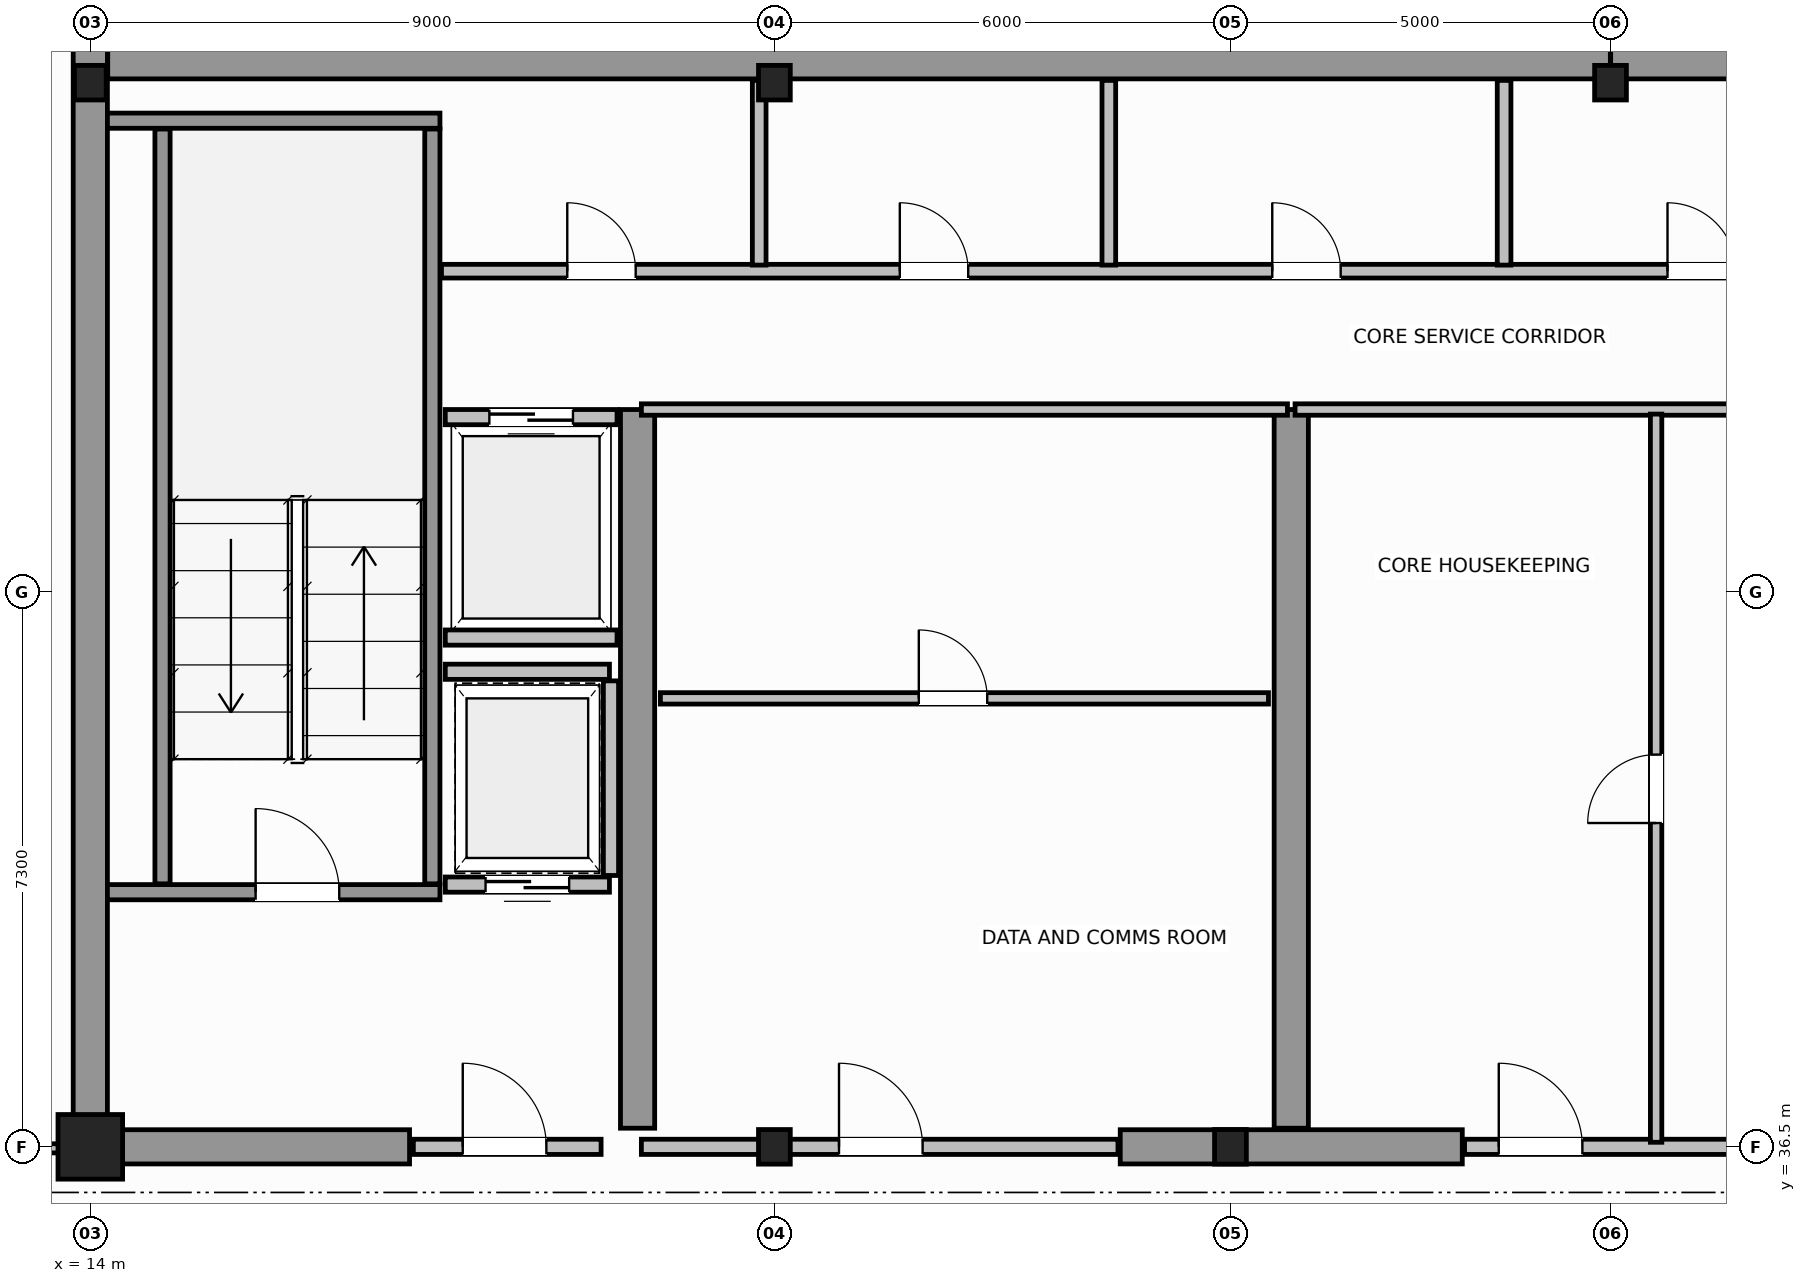
"""IFC4 building model, lengths in metres.
Left out: names, types, materials, properties, quantities, classifications, styles, units other than length and angle.
Written with IfcOpenShell. Run it as: python <this file> out.ifc"""

import sys

from ifc_helpers import new_model, si_unit, direction, frame, frame_2d, origin, origin_2d, place, context, subcontext, project, spatial, rectangle, i_section, extrude, source, transform, mapped, element, fill, save


model = new_model("IFC4")
c1 = context("Model", 3, precision=1e-05, world=origin(), true_north=direction((0.0, 1.0)))
c2 = subcontext(c1, "Body", "Model", "MODEL_VIEW")
j1 = project(units=[si_unit("LENGTHUNIT", "METRE"), si_unit("PLANEANGLEUNIT", "RADIAN")], contexts=[c1])
p1 = place(None, origin())
s1 = spatial("IfcSite", under=j1, at=p1, CompositionType="ELEMENT")
p2 = place(p1, origin())
s2 = spatial("IfcBuilding", under=s1, at=p2, CompositionType="ELEMENT")
p3 = place(p2, frame((0.0, 0.0, 265.0)))
s3 = spatial("IfcBuildingStorey", under=s2, at=p3, CompositionType="ELEMENT", Elevation=265.0)
m1 = source(origin(), c2, "Body", "SweptSolid", [
    extrude(rectangle(XDim=0.85, YDim=0.85, at=origin_2d()), origin(), (0.0, 0.0, 1.0), 3.8),
])
p4 = place(p3, frame((14.0, 36.5, 0.0), z_axis=(0.0, 0.0, 1.0), x_axis=(1.0, 0.0, 0.0)))
e1 = element("IfcColumn", 1, at=p4, inside=s3, PredefinedType="COLUMN", context=c2, shape_type="MappedRepresentation", body=[
    mapped(m1, transform((0.0, 0.0, 0.0), scale=1.0)),
])
m2 = source(origin(), c2, "Body", "SweptSolid", [
    extrude(i_section(OverallWidth=0.418, OverallDepth=0.455, WebThickness=0.042, FlangeThickness=0.058, FilletRadius=0.015, at=origin_2d()), origin(), (0.0, 0.0, 1.0), 3.8),
])
for number, where, z_axis, x_axis in (
    (2, (23.0, 36.5, 0.0), (0.0, 0.0, 1.0), (1.0, 0.0, 0.0)),
    (3, (29.0, 36.5, 0.0), (0.0, 0.0, 1.0), (1.0, 0.0, 0.0)),
    (4, (14.0, 50.5, 0.0), (0.0, 0.0, 1.0), (1.0, 0.0, 0.0)),
    (5, (23.0, 50.5, 0.0), (0.0, 0.0, 1.0), (1.0, 0.0, 0.0)),
    (6, (34.0, 50.5, 0.0), (0.0, 0.0, 1.0), (1.0, 0.0, 0.0)),
):
    element("IfcColumn", number, at=place(p3, frame(where, z_axis=z_axis, x_axis=x_axis)), inside=s3, PredefinedType="COLUMN", context=c2, shape_type="MappedRepresentation", body=[
        mapped(m2, transform((0.0, 0.0, 0.0), scale=1.0)),
    ])
for number, where, z_axis, x_axis in (
    (7, (14.229, 50.775, 0.0), (0.0, 0.0, 1.0), (1.0, 0.0, 0.0)),
    (8, (34.002, 50.775, 0.0), (0.0, 0.0, 1.0), (1.0, 0.0, 0.0)),
):
    element("IfcWall", number, at=place(p3, frame(where, z_axis=z_axis, x_axis=x_axis)), inside=s3, PredefinedType="SHEAR", context=c2, shape_type="SweptSolid", body=[
        extrude(rectangle(XDim=19.769, YDim=0.45, at=frame_2d((9.885, 0.0))), origin(), (0.0, 0.0, 1.0), 3.8),
    ])
p5 = place(p3, frame((14.0, 36.5, 0.0), z_axis=(0.0, 0.0, 1.0), x_axis=(0.0, 1.0, 0.0)))
e9 = element("IfcWall", 9, at=p5, inside=s3, PredefinedType="SHEAR", context=c2, shape_type="SweptSolid", body=[
    extrude(rectangle(XDim=14.5, YDim=0.45, at=frame_2d((7.25, 0.0))), origin(), (0.0, 0.0, 1.0), 3.8),
])
p6 = place(p3, frame((14.245, 36.5, 0.0), z_axis=(0.0, 0.0, 1.0), x_axis=(1.0, 0.0, 0.0)))
e10 = element("IfcWall", 10, at=p6, inside=s3, PredefinedType="SHEAR", context=c2, shape_type="SweptSolid", body=[
    extrude(rectangle(XDim=3.955, YDim=0.45, at=frame_2d((1.978, 0.0))), origin(), (0.0, 0.0, 1.0), 2.58),
])
p7 = place(p3, frame((27.55, 36.5, 0.0), z_axis=(0.0, 0.0, 1.0), x_axis=(1.0, 0.0, 0.0)))
e11 = element("IfcWall", 11, at=p7, inside=s3, PredefinedType="SHEAR", context=c2, shape_type="SweptSolid", body=[
    extrude(rectangle(XDim=4.5, YDim=0.45, at=frame_2d((2.25, 0.0))), origin(), (0.0, 0.0, 1.0), 3.8),
])
for number, where, z_axis, x_axis in (
    (12, (21.2, 36.745, 0.0), (0.0, 0.0, 1.0), (0.0, 1.0, 0.0)),
    (13, (29.8, 36.745, 0.0), (0.0, 0.0, 1.0), (0.0, 1.0, 0.0)),
):
    element("IfcWall", number, at=place(p3, frame(where, z_axis=z_axis, x_axis=x_axis)), inside=s3, PredefinedType="SHEAR", context=c2, shape_type="SweptSolid", body=[
        extrude(rectangle(XDim=9.455, YDim=0.45, at=frame_2d((4.728, 0.0))), origin(), (0.0, 0.0, 1.0), 3.8),
    ])
p8 = place(p3, frame((14.225, 39.85, 0.0), z_axis=(0.0, 0.0, 1.0), x_axis=(1.0, 0.0, 0.0)))
e14 = element("IfcWall", 14, at=p8, inside=s3, PredefinedType="SOLIDWALL", context=c2, shape_type="SweptSolid", body=[
    extrude(rectangle(XDim=4.375, YDim=0.2, at=frame_2d((2.188, 0.0))), origin(), (0.0, 0.0, 1.0), 3.8),
])
p9 = place(p8, frame((1.95, 0.0, 0.0)))
e15 = element("IfcOpeningElement", 15, at=p9, cuts=e14, PredefinedType="OPENING", context=c2, shape_type="SweptSolid", body=[
    extrude(rectangle(XDim=1.1, YDim=2.15, at=frame_2d((0.55, 1.075))), frame((0.0, 0.11, 0.0), z_axis=(0.0, -1.0, 0.0), x_axis=(1.0, 0.0, 0.0)), (0.0, 0.0, 1.0), 0.22),
])
p10 = place(p3, frame((14.225, 50.0, 0.0), z_axis=(0.0, 0.0, 1.0), x_axis=(1.0, 0.0, 0.0)))
e16 = element("IfcWall", 16, at=p10, inside=s3, PredefinedType="SOLIDWALL", context=c2, shape_type="SweptSolid", body=[
    extrude(rectangle(XDim=4.375, YDim=0.2, at=frame_2d((2.188, 0.0))), origin(), (0.0, 0.0, 1.0), 3.8),
])
for number, where, z_axis, x_axis in (
    (17, (14.95, 39.96, 0.0), (0.0, 0.0, 1.0), (0.0, 1.0, 0.0)),
    (18, (18.5, 39.96, 0.0), (0.0, 0.0, 1.0), (0.0, 1.0, 0.0)),
):
    element("IfcWall", number, at=place(p3, frame(where, z_axis=z_axis, x_axis=x_axis)), inside=s3, PredefinedType="SOLIDWALL", context=c2, shape_type="SweptSolid", body=[
        extrude(rectangle(XDim=9.93, YDim=0.2, at=frame_2d((4.965, 0.0))), origin(), (0.0, 0.0, 1.0), 3.8),
    ])
p11 = place(p3, frame((18.25, 36.5, 0.0), z_axis=(0.0, 0.0, 1.0), x_axis=(1.0, 0.0, 0.0)))
e19 = element("IfcWall", 19, at=p11, inside=s3, PredefinedType="SOLIDWALL", context=c2, shape_type="SweptSolid", body=[
    extrude(rectangle(XDim=2.47, YDim=0.2, at=frame_2d((1.235, 0.0))), origin(), (0.0, 0.0, 1.0), 2.57),
])
p12 = place(p11, frame((0.65, 0.0, 0.0)))
e20 = element("IfcOpeningElement", 20, at=p12, cuts=e19, PredefinedType="OPENING", context=c2, shape_type="SweptSolid", body=[
    extrude(rectangle(XDim=1.1, YDim=2.15, at=frame_2d((0.55, 1.075))), frame((0.0, 0.11, 0.0), z_axis=(0.0, -1.0, 0.0), x_axis=(1.0, 0.0, 0.0)), (0.0, 0.0, 1.0), 0.22),
])
p13 = place(p3, frame((18.67, 46.1, 0.0), z_axis=(0.0, 0.0, 1.0), x_axis=(1.0, 0.0, 0.0)))
e21 = element("IfcWall", 21, at=p13, inside=s3, PredefinedType="SOLIDWALL", context=c2, shape_type="SweptSolid", body=[
    extrude(rectangle(XDim=2.26, YDim=0.2, at=frame_2d((1.13, 0.0))), origin(), (0.0, 0.0, 1.0), 3.58),
])
p14 = place(p13, frame((0.58, 0.0, 0.0)))
e22 = element("IfcOpeningElement", 22, at=p14, cuts=e21, PredefinedType="OPENING", context=c2, shape_type="SweptSolid", body=[
    extrude(rectangle(XDim=1.1, YDim=2.15, at=frame_2d((0.55, 1.075))), frame((0.0, 0.11, 0.0), z_axis=(0.0, -1.0, 0.0), x_axis=(1.0, 0.0, 0.0)), (0.0, 0.0, 1.0), 0.22),
])
p15 = place(p3, frame((18.67, 43.2, 0.0), z_axis=(0.0, 0.0, 1.0), x_axis=(1.0, 0.0, 0.0)))
e23 = element("IfcWall", 23, at=p15, inside=s3, PredefinedType="SOLIDWALL", context=c2, shape_type="SweptSolid", body=[
    extrude(rectangle(XDim=2.26, YDim=0.2, at=frame_2d((1.13, 0.0))), origin(), (0.0, 0.0, 1.0), 3.58),
])
p16 = place(p3, frame((18.67, 39.95, 0.0), z_axis=(0.0, 0.0, 1.0), x_axis=(1.0, 0.0, 0.0)))
e24 = element("IfcWall", 24, at=p16, inside=s3, PredefinedType="SOLIDWALL", context=c2, shape_type="SweptSolid", body=[
    extrude(rectangle(XDim=2.16, YDim=0.2, at=frame_2d((1.08, 0.0))), origin(), (0.0, 0.0, 1.0), 3.58),
])
p17 = place(p16, frame((0.53, 0.0, 0.0)))
e25 = element("IfcOpeningElement", 25, at=p17, cuts=e24, PredefinedType="OPENING", context=c2, shape_type="SweptSolid", body=[
    extrude(rectangle(XDim=1.1, YDim=2.15, at=frame_2d((0.55, 1.075))), frame((0.0, 0.11, 0.0), z_axis=(0.0, -1.0, 0.0), x_axis=(1.0, 0.0, 0.0)), (0.0, 0.0, 1.0), 0.22),
])
p18 = place(p3, frame((18.67, 42.75, 0.0), z_axis=(0.0, 0.0, 1.0), x_axis=(1.0, 0.0, 0.0)))
e26 = element("IfcWall", 26, at=p18, inside=s3, PredefinedType="SOLIDWALL", context=c2, shape_type="SweptSolid", body=[
    extrude(rectangle(XDim=2.16, YDim=0.2, at=frame_2d((1.08, 0.0))), origin(), (0.0, 0.0, 1.0), 3.58),
])
p19 = place(p3, frame((20.85, 40.07, 0.0), z_axis=(0.0, 0.0, 1.0), x_axis=(0.0, 1.0, 0.0)))
e27 = element("IfcWall", 27, at=p19, inside=s3, PredefinedType="SOLIDWALL", context=c2, shape_type="SweptSolid", body=[
    extrude(rectangle(XDim=2.56, YDim=0.2, at=frame_2d((1.28, 0.0))), origin(), (0.0, 0.0, 1.0), 3.58),
])
p20 = place(p3, frame((21.25, 36.5, 0.0), z_axis=(0.0, 0.0, 1.0), x_axis=(1.0, 0.0, 0.0)))
e28 = element("IfcWall", 28, at=p20, inside=s3, PredefinedType="SOLIDWALL", context=c2, shape_type="SweptSolid", body=[
    extrude(rectangle(XDim=6.27, YDim=0.2, at=frame_2d((3.135, 0.0))), origin(), (0.0, 0.0, 1.0), 2.37),
])
p21 = place(p20, frame((2.6, 0.0, 0.0)))
e29 = element("IfcOpeningElement", 29, at=p21, cuts=e28, PredefinedType="OPENING", context=c2, shape_type="SweptSolid", body=[
    extrude(rectangle(XDim=1.1, YDim=2.15, at=frame_2d((0.55, 1.075))), frame((0.0, 0.11, 0.0), z_axis=(0.0, -1.0, 0.0), x_axis=(1.0, 0.0, 0.0)), (0.0, 0.0, 1.0), 0.22),
])
p22 = place(p3, frame((21.25, 46.2, 0.0), z_axis=(0.0, 0.0, 1.0), x_axis=(1.0, 0.0, 0.0)))
e30 = element("IfcWall", 30, at=p22, inside=s3, PredefinedType="PARTITIONING", context=c2, shape_type="SweptSolid", body=[
    extrude(rectangle(XDim=8.5, YDim=0.15, at=frame_2d((4.25, 0.0))), origin(), (0.0, 0.0, 1.0), 3.58),
])
p23 = place(p3, frame((21.5, 42.4, 0.0), z_axis=(0.0, 0.0, 1.0), x_axis=(1.0, 0.0, 0.0)))
e31 = element("IfcWall", 31, at=p23, inside=s3, PredefinedType="PARTITIONING", context=c2, shape_type="SweptSolid", body=[
    extrude(rectangle(XDim=8.0, YDim=0.15, at=frame_2d((4.0, 0.0))), origin(), (0.0, 0.0, 1.0), 3.58),
])
p24 = place(p23, frame((3.4, 0.0, 0.0)))
e32 = element("IfcOpeningElement", 32, at=p24, cuts=e31, PredefinedType="OPENING", context=c2, shape_type="SweptSolid", body=[
    extrude(rectangle(XDim=0.9, YDim=2.1, at=frame_2d((0.45, 1.05))), frame((0.0, 0.085, 0.0), z_axis=(0.0, -1.0, 0.0), x_axis=(1.0, 0.0, 0.0)), (0.0, 0.0, 1.0), 0.17),
])
p25 = place(p3, frame((32.08, 36.5, 0.0), z_axis=(0.0, 0.0, 1.0), x_axis=(1.0, 0.0, 0.0)))
e33 = element("IfcWall", 33, at=p25, inside=s3, PredefinedType="SOLIDWALL", context=c2, shape_type="SweptSolid", body=[
    extrude(rectangle(XDim=4.04, YDim=0.2, at=frame_2d((2.02, 0.0))), origin(), (0.0, 0.0, 1.0), 2.37),
])
p26 = place(p25, frame((0.45, 0.0, 0.0)))
e34 = element("IfcOpeningElement", 34, at=p26, cuts=e33, PredefinedType="OPENING", context=c2, shape_type="SweptSolid", body=[
    extrude(rectangle(XDim=1.1, YDim=2.15, at=frame_2d((0.55, 1.075))), frame((0.0, 0.11, 0.0), z_axis=(0.0, -1.0, 0.0), x_axis=(1.0, 0.0, 0.0)), (0.0, 0.0, 1.0), 0.22),
])
p27 = place(p3, frame((29.85, 46.2, 0.0), z_axis=(0.0, 0.0, 1.0), x_axis=(1.0, 0.0, 0.0)))
e35 = element("IfcWall", 35, at=p27, inside=s3, PredefinedType="PARTITIONING", context=c2, shape_type="SweptSolid", body=[
    extrude(rectangle(XDim=8.5, YDim=0.15, at=frame_2d((4.25, 0.0))), origin(), (0.0, 0.0, 1.0), 3.58),
])
p28 = place(p3, frame((34.6, 36.56, 0.0), z_axis=(0.0, 0.0, 1.0), x_axis=(0.0, 1.0, 0.0)))
e36 = element("IfcWall", 36, at=p28, inside=s3, PredefinedType="PARTITIONING", context=c2, shape_type="SweptSolid", body=[
    extrude(rectangle(XDim=9.58, YDim=0.15, at=frame_2d((4.79, 0.0))), origin(), (0.0, 0.0, 1.0), 3.58),
])
p29 = place(p28, frame((4.2, 0.0, 0.0)))
e37 = element("IfcOpeningElement", 37, at=p29, cuts=e36, PredefinedType="OPENING", context=c2, shape_type="SweptSolid", body=[
    extrude(rectangle(XDim=0.9, YDim=2.1, at=frame_2d((0.45, 1.05))), frame((0.0, 0.085, 0.0), z_axis=(0.0, -1.0, 0.0), x_axis=(1.0, 0.0, 0.0)), (0.0, 0.0, 1.0), 0.17),
])
p30 = place(p3, frame((18.62, 48.02, 0.0), z_axis=(0.0, 0.0, 1.0), x_axis=(1.0, 0.0, 0.0)))
e38 = element("IfcWall", 38, at=p30, inside=s3, PredefinedType="PLUMBINGWALL", context=c2, shape_type="SweptSolid", body=[
    extrude(rectangle(XDim=30.76, YDim=0.18, at=frame_2d((15.38, 0.0))), origin(), (0.0, 0.0, 1.0), 3.58),
])
p31 = place(p30, frame((1.655, 0.0, 0.0)))
e39 = element("IfcOpeningElement", 39, at=p31, cuts=e38, PredefinedType="OPENING", context=c2, shape_type="SweptSolid", body=[
    extrude(rectangle(XDim=0.9, YDim=2.15, at=frame_2d((0.45, 1.075))), frame((0.0, 0.1, 0.0), z_axis=(0.0, -1.0, 0.0), x_axis=(1.0, 0.0, 0.0)), (0.0, 0.0, 1.0), 0.2),
])
p32 = place(p30, frame((6.03, 0.0, 0.0)))
e40 = element("IfcOpeningElement", 40, at=p32, cuts=e38, PredefinedType="OPENING", context=c2, shape_type="SweptSolid", body=[
    extrude(rectangle(XDim=0.9, YDim=2.15, at=frame_2d((0.45, 1.075))), frame((0.0, 0.1, 0.0), z_axis=(0.0, -1.0, 0.0), x_axis=(1.0, 0.0, 0.0)), (0.0, 0.0, 1.0), 0.2),
])
p33 = place(p30, frame((10.93, 0.0, 0.0)))
e41 = element("IfcOpeningElement", 41, at=p33, cuts=e38, PredefinedType="OPENING", context=c2, shape_type="SweptSolid", body=[
    extrude(rectangle(XDim=0.9, YDim=2.15, at=frame_2d((0.45, 1.075))), frame((0.0, 0.1, 0.0), z_axis=(0.0, -1.0, 0.0), x_axis=(1.0, 0.0, 0.0)), (0.0, 0.0, 1.0), 0.2),
])
p34 = place(p30, frame((16.13, 0.0, 0.0)))
e42 = element("IfcOpeningElement", 42, at=p34, cuts=e38, PredefinedType="OPENING", context=c2, shape_type="SweptSolid", body=[
    extrude(rectangle(XDim=0.9, YDim=2.15, at=frame_2d((0.45, 1.075))), frame((0.0, 0.1, 0.0), z_axis=(0.0, -1.0, 0.0), x_axis=(1.0, 0.0, 0.0)), (0.0, 0.0, 1.0), 0.2),
])
p35 = place(p30, frame((21.73, 0.0, 0.0)))
e43 = element("IfcOpeningElement", 43, at=p35, cuts=e38, PredefinedType="OPENING", context=c2, shape_type="SweptSolid", body=[
    extrude(rectangle(XDim=0.9, YDim=2.15, at=frame_2d((0.45, 1.075))), frame((0.0, 0.1, 0.0), z_axis=(0.0, -1.0, 0.0), x_axis=(1.0, 0.0, 0.0)), (0.0, 0.0, 1.0), 0.2),
])
p36 = place(p30, frame((27.505, 0.0, 0.0)))
e44 = element("IfcOpeningElement", 44, at=p36, cuts=e38, PredefinedType="OPENING", context=c2, shape_type="SweptSolid", body=[
    extrude(rectangle(XDim=0.9, YDim=2.15, at=frame_2d((0.45, 1.075))), frame((0.0, 0.1, 0.0), z_axis=(0.0, -1.0, 0.0), x_axis=(1.0, 0.0, 0.0)), (0.0, 0.0, 1.0), 0.2),
])
p37 = place(p3, frame((22.8, 48.1, 0.0), z_axis=(0.0, 0.0, 1.0), x_axis=(0.0, 1.0, 0.0)))
e45 = element("IfcWall", 45, at=p37, inside=s3, PredefinedType="PLUMBINGWALL", context=c2, shape_type="SweptSolid", body=[
    extrude(rectangle(XDim=2.43, YDim=0.18, at=frame_2d((1.215, 0.0))), origin(), (0.0, 0.0, 1.0), 2.37),
])
for number, where, z_axis, x_axis in (
    (46, (27.4, 48.1, 0.0), (0.0, 0.0, 1.0), (0.0, 1.0, 0.0)),
    (47, (32.6, 48.1, 0.0), (0.0, 0.0, 1.0), (0.0, 1.0, 0.0)),
):
    element("IfcWall", number, at=place(p3, frame(where, z_axis=z_axis, x_axis=x_axis)), inside=s3, PredefinedType="PLUMBINGWALL", context=c2, shape_type="SweptSolid", body=[
        extrude(rectangle(XDim=2.43, YDim=0.18, at=frame_2d((1.215, 0.0))), origin(), (0.0, 0.0, 1.0), 3.58),
    ])
p38 = place(p3, frame((7.321, 36.48, 0.0), z_axis=(0.0, 0.0, 1.0), x_axis=(1.0, 0.0, 0.0)))
e48 = element("IfcWall", 48, at=p38, inside=s3, PredefinedType="PARTITIONING", context=c2, shape_type="SweptSolid", body=[
    extrude(rectangle(XDim=6.619, YDim=0.12, at=frame_2d((3.31, 0.0))), origin(), (0.0, 0.0, 1.0), 2.37),
])
p39 = place(p38, frame((2.859, 0.0, 0.0)))
e49 = element("IfcOpeningElement", 49, at=p39, cuts=e48, PredefinedType="OPENING", context=c2, shape_type="SweptSolid", body=[
    extrude(rectangle(XDim=0.9, YDim=2.15, at=frame_2d((0.45, 1.075))), frame((0.0, 0.07, 0.0), z_axis=(0.0, -1.0, 0.0), x_axis=(1.0, 0.0, 0.0)), (0.0, 0.0, 1.0), 0.14),
])
m3 = source(origin(), c2, "Body", "SweptSolid", [
    extrude(rectangle(XDim=1.1, YDim=2.15, at=frame_2d((0.55, 1.075))), frame((0.0, 0.025, 0.0), z_axis=(0.0, -1.0, 0.0), x_axis=(1.0, 0.0, 0.0)), (0.0, 0.0, 1.0), 0.05),
])
p40 = place(p9, origin())
e50 = element("IfcDoor", 50, at=p40, inside=s3, OperationType="SINGLE_SWING_LEFT", PredefinedType="DOOR", context=c2, shape_type="MappedRepresentation", body=[
    mapped(m3, transform((0.0, 0.0, 0.0), scale=1.0)),
])
fill(e15, e50)
p41 = place(p12, origin())
e51 = element("IfcDoor", 51, at=p41, inside=s3, OperationType="SINGLE_SWING_RIGHT", PredefinedType="DOOR", context=c2, shape_type="MappedRepresentation", body=[
    mapped(m3, transform((0.0, 0.0, 0.0), scale=1.0)),
])
fill(e20, e51)
p42 = place(p14, origin())
e52 = element("IfcDoor", 52, at=p42, inside=s3, OperationType="DOUBLE_DOOR_SLIDING", PredefinedType="DOOR", context=c2, shape_type="MappedRepresentation", body=[
    mapped(m3, transform((0.0, 0.0, 0.0), scale=1.0)),
])
fill(e22, e52)
p43 = place(p17, origin())
e53 = element("IfcDoor", 53, at=p43, inside=s3, OperationType="DOUBLE_DOOR_SLIDING", PredefinedType="DOOR", context=c2, shape_type="MappedRepresentation", body=[
    mapped(m3, transform((0.0, 0.0, 0.0), scale=1.0)),
])
fill(e25, e53)
p44 = place(p21, origin())
e54 = element("IfcDoor", 54, at=p44, inside=s3, OperationType="SINGLE_SWING_LEFT", PredefinedType="DOOR", context=c2, shape_type="MappedRepresentation", body=[
    mapped(m3, transform((0.0, 0.0, 0.0), scale=1.0)),
])
fill(e29, e54)
m4 = source(origin(), c2, "Body", "SweptSolid", [
    extrude(rectangle(XDim=0.9, YDim=2.1, at=frame_2d((0.45, 1.05))), frame((0.0, 0.025, 0.0), z_axis=(0.0, -1.0, 0.0), x_axis=(1.0, 0.0, 0.0)), (0.0, 0.0, 1.0), 0.05),
])
p45 = place(p24, origin())
e55 = element("IfcDoor", 55, at=p45, inside=s3, OperationType="SINGLE_SWING_RIGHT", PredefinedType="DOOR", context=c2, shape_type="MappedRepresentation", body=[
    mapped(m4, transform((0.0, 0.0, 0.0), scale=1.0)),
])
fill(e32, e55)
p46 = place(p26, origin())
e56 = element("IfcDoor", 56, at=p46, inside=s3, OperationType="SINGLE_SWING_LEFT", PredefinedType="DOOR", context=c2, shape_type="MappedRepresentation", body=[
    mapped(m3, transform((0.0, 0.0, 0.0), scale=1.0)),
])
fill(e34, e56)
p47 = place(p29, origin())
e57 = element("IfcDoor", 57, at=p47, inside=s3, OperationType="SINGLE_SWING_RIGHT", PredefinedType="DOOR", context=c2, shape_type="MappedRepresentation", body=[
    mapped(m4, transform((0.0, 0.0, 0.0), scale=1.0)),
])
fill(e37, e57)
m5 = source(origin(), c2, "Body", "SweptSolid", [
    extrude(rectangle(XDim=0.9, YDim=2.15, at=frame_2d((0.45, 1.075))), frame((0.0, 0.025, 0.0), z_axis=(0.0, -1.0, 0.0), x_axis=(1.0, 0.0, 0.0)), (0.0, 0.0, 1.0), 0.05),
])
p48 = place(p31, origin())
e58 = element("IfcDoor", 58, at=p48, inside=s3, OperationType="SINGLE_SWING_LEFT", PredefinedType="DOOR", context=c2, shape_type="MappedRepresentation", body=[
    mapped(m5, transform((0.0, 0.0, 0.0), scale=1.0)),
])
fill(e39, e58)
p49 = place(p32, origin())
e59 = element("IfcDoor", 59, at=p49, inside=s3, OperationType="SINGLE_SWING_RIGHT", PredefinedType="DOOR", context=c2, shape_type="MappedRepresentation", body=[
    mapped(m5, transform((0.0, 0.0, 0.0), scale=1.0)),
])
fill(e40, e59)
p50 = place(p33, origin())
e60 = element("IfcDoor", 60, at=p50, inside=s3, OperationType="SINGLE_SWING_LEFT", PredefinedType="DOOR", context=c2, shape_type="MappedRepresentation", body=[
    mapped(m5, transform((0.0, 0.0, 0.0), scale=1.0)),
])
fill(e41, e60)
p51 = place(p34, origin())
e61 = element("IfcDoor", 61, at=p51, inside=s3, OperationType="SINGLE_SWING_RIGHT", PredefinedType="DOOR", context=c2, shape_type="MappedRepresentation", body=[
    mapped(m5, transform((0.0, 0.0, 0.0), scale=1.0)),
])
fill(e42, e61)
save(model, sys.argv[1])
